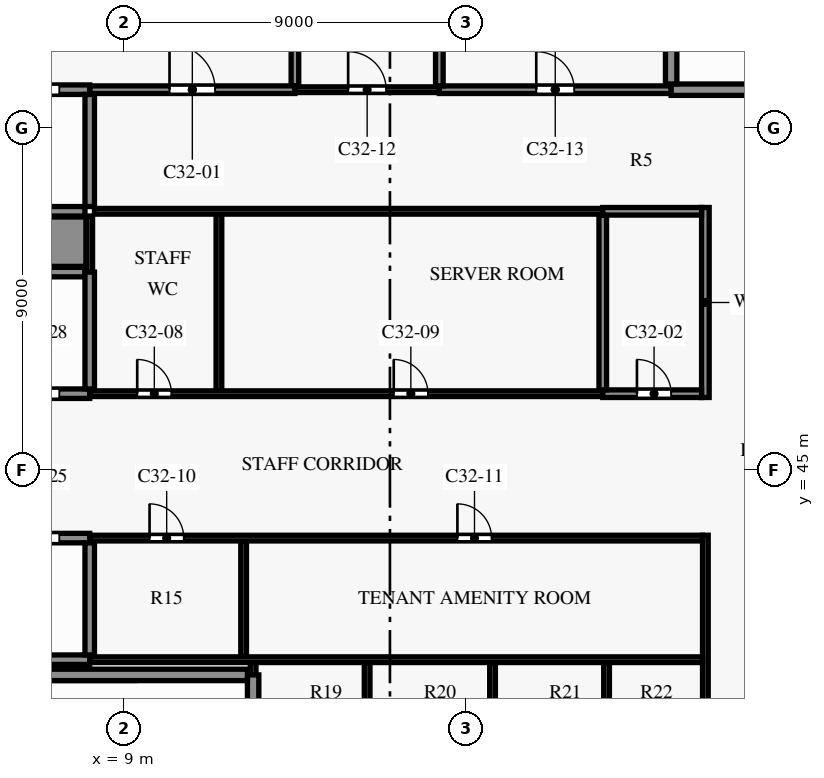
"""IFC4 building model, lengths in metres.
Left out: names, types, materials, properties, quantities, classifications, styles, units other than length and angle.
Written with IfcOpenShell. Run it as: python <this file> out.ifc"""

import sys

from ifc_helpers import new_model, si_unit, direction, frame, frame_2d, origin, place, context, subcontext, project, spatial, rectangle, extrude, element, fill, save


model = new_model("IFC4")
c1 = context("Model", 3, precision=1e-05, world=origin(), true_north=direction((0.0, 1.0)))
c2 = subcontext(c1, "Body", "Model", "MODEL_VIEW")
j1 = project(units=[si_unit("LENGTHUNIT", "METRE"), si_unit("PLANEANGLEUNIT", "RADIAN")], contexts=[c1])
p1 = place(None, origin())
s1 = spatial("IfcSite", under=j1, at=p1, CompositionType="ELEMENT")
p2 = place(p1, origin())
s2 = spatial("IfcBuilding", under=s1, at=p2, CompositionType="ELEMENT")
p3 = place(p2, frame((0.0, 0.0, 240.6)))
s3 = spatial("IfcBuildingStorey", under=s2, at=p3, CompositionType="ELEMENT", Elevation=240.6)
p4 = place(p3, frame((4.55, 39.6, 0.0), z_axis=(0.0, 0.0, 1.0), x_axis=(1.0, 0.0, 0.0)))
e1 = element("IfcWall", 1, at=p4, inside=s3, PredefinedType="SHEAR", context=c2, shape_type="SweptSolid", body=[
    extrude(rectangle(XDim=7.7, YDim=0.3, at=frame_2d((3.85, 0.0))), origin(), (0.0, 0.0, 1.0), 3.5),
])
p5 = place(p3, frame((8.1, 40.0, 0.0), z_axis=(0.0, 0.0, 1.0), x_axis=(1.0, 0.0, 0.0)))
e2 = element("IfcWall", 2, at=p5, inside=s3, PredefinedType="PARTITIONING", context=c2, shape_type="SweptSolid", body=[
    extrude(rectangle(XDim=16.125, YDim=0.15, at=frame_2d((8.062, 0.0))), origin(), (0.0, 0.0, 1.0), 3.5),
])
p6 = place(p3, frame((0.15, 40.0, 0.0), z_axis=(0.0, 0.0, 1.0), x_axis=(1.0, 0.0, 0.0)))
e3 = element("IfcWall", 3, at=p6, inside=s3, PredefinedType="SHEAR", context=c2, shape_type="SweptSolid", body=[
    extrude(rectangle(XDim=7.95, YDim=0.25, at=frame_2d((3.975, 0.0))), origin(), (0.0, 0.0, 1.0), 3.5),
])
p7 = place(p3, frame((8.1, 43.2, 0.0), z_axis=(0.0, 0.0, 1.0), x_axis=(1.0, 0.0, 0.0)))
e4 = element("IfcWall", 4, at=p7, inside=s3, PredefinedType="PARTITIONING", context=c2, shape_type="SweptSolid", body=[
    extrude(rectangle(XDim=16.125, YDim=0.15, at=frame_2d((8.062, 0.0))), origin(), (0.0, 0.0, 1.0), 3.5),
])
p8 = place(p7, frame((1.575, 0.0, 0.0)))
e5 = element("IfcOpeningElement", 5, at=p8, cuts=e4, PredefinedType="OPENING", context=c2, shape_type="SweptSolid", body=[
    extrude(rectangle(XDim=0.9, YDim=2.1, at=frame_2d((0.45, 1.05))), frame((0.0, 0.085, 0.0), z_axis=(0.0, -1.0, 0.0), x_axis=(1.0, 0.0, 0.0)), (0.0, 0.0, 1.0), 0.17),
])
p9 = place(p7, frame((9.675, 0.0, 0.0)))
e6 = element("IfcOpeningElement", 6, at=p9, cuts=e4, PredefinedType="OPENING", context=c2, shape_type="SweptSolid", body=[
    extrude(rectangle(XDim=0.9, YDim=2.1, at=frame_2d((0.45, 1.05))), frame((0.0, 0.085, 0.0), z_axis=(0.0, -1.0, 0.0), x_axis=(1.0, 0.0, 0.0)), (0.0, 0.0, 1.0), 0.17),
])
p10 = place(p3, frame((0.125, 43.2, 0.0), z_axis=(0.0, 0.0, 1.0), x_axis=(1.0, 0.0, 0.0)))
e7 = element("IfcWall", 7, at=p10, inside=s3, PredefinedType="SHEAR", context=c2, shape_type="SweptSolid", body=[
    extrude(rectangle(XDim=7.975, YDim=0.25, at=frame_2d((3.988, 0.0))), origin(), (0.0, 0.0, 1.0), 3.5),
])
p11 = place(p10, frame((0.675, 0.0, 0.0)))
e8 = element("IfcOpeningElement", 8, at=p11, cuts=e7, PredefinedType="OPENING", context=c2, shape_type="SweptSolid", body=[
    extrude(rectangle(XDim=1.1, YDim=2.1, at=frame_2d((0.55, 1.05))), frame((0.0, 0.135, 0.0), z_axis=(0.0, -1.0, 0.0), x_axis=(1.0, 0.0, 0.0)), (0.0, 0.0, 1.0), 0.27),
])
p12 = place(p10, frame((3.375, 0.0, 0.0)))
e9 = element("IfcOpeningElement", 9, at=p12, cuts=e7, PredefinedType="OPENING", context=c2, shape_type="SweptSolid", body=[
    extrude(rectangle(XDim=1.1, YDim=2.1, at=frame_2d((0.55, 1.05))), frame((0.0, 0.135, 0.0), z_axis=(0.0, -1.0, 0.0), x_axis=(1.0, 0.0, 0.0)), (0.0, 0.0, 1.0), 0.27),
])
p13 = place(p10, frame((6.075, 0.0, 0.0)))
e10 = element("IfcOpeningElement", 10, at=p13, cuts=e7, PredefinedType="OPENING", context=c2, shape_type="SweptSolid", body=[
    extrude(rectangle(XDim=1.1, YDim=2.1, at=frame_2d((0.55, 1.05))), frame((0.0, 0.135, 0.0), z_axis=(0.0, -1.0, 0.0), x_axis=(1.0, 0.0, 0.0)), (0.0, 0.0, 1.0), 0.27),
])
p14 = place(p3, frame((8.1, 47.0, 0.0), z_axis=(0.0, 0.0, 1.0), x_axis=(1.0, 0.0, 0.0)))
e11 = element("IfcWall", 11, at=p14, inside=s3, PredefinedType="PARTITIONING", context=c2, shape_type="SweptSolid", body=[
    extrude(rectangle(XDim=13.5, YDim=0.15, at=frame_2d((6.75, 0.0))), origin(), (0.0, 0.0, 1.0), 3.5),
])
p15 = place(p14, frame((1.25, 0.0, 0.0)))
e12 = element("IfcOpeningElement", 12, at=p15, cuts=e11, PredefinedType="OPENING", context=c2, shape_type="SweptSolid", body=[
    extrude(rectangle(XDim=0.9, YDim=2.1, at=frame_2d((0.45, 1.05))), frame((0.0, 0.085, 0.0), z_axis=(0.0, -1.0, 0.0), x_axis=(1.0, 0.0, 0.0)), (0.0, 0.0, 1.0), 0.17),
])
p16 = place(p14, frame((8.0, 0.0, 0.0)))
e13 = element("IfcOpeningElement", 13, at=p16, cuts=e11, PredefinedType="OPENING", context=c2, shape_type="SweptSolid", body=[
    extrude(rectangle(XDim=0.9, YDim=2.1, at=frame_2d((0.45, 1.05))), frame((0.0, 0.085, 0.0), z_axis=(0.0, -1.0, 0.0), x_axis=(1.0, 0.0, 0.0)), (0.0, 0.0, 1.0), 0.17),
])
p17 = place(p3, frame((21.6, 47.0, 0.0), z_axis=(0.0, 0.0, 1.0), x_axis=(1.0, 0.0, 0.0)))
e14 = element("IfcWall", 14, at=p17, inside=s3, PredefinedType="PARTITIONING", context=c2, shape_type="SweptSolid", body=[
    extrude(rectangle(XDim=2.6, YDim=0.2, at=frame_2d((1.3, 0.0))), origin(), (0.0, 0.0, 1.0), 3.5),
])
p18 = place(p17, frame((0.9, 0.0, 0.0)))
e15 = element("IfcOpeningElement", 15, at=p18, cuts=e14, PredefinedType="OPENING", context=c2, shape_type="SweptSolid", body=[
    extrude(rectangle(XDim=0.9, YDim=2.1, at=frame_2d((0.45, 1.05))), frame((0.0, 0.11, 0.0), z_axis=(0.0, -1.0, 0.0), x_axis=(1.0, 0.0, 0.0)), (0.0, 0.0, 1.0), 0.22),
])
p19 = place(p3, frame((0.125, 47.0, 0.0), z_axis=(0.0, 0.0, 1.0), x_axis=(1.0, 0.0, 0.0)))
e16 = element("IfcWall", 16, at=p19, inside=s3, PredefinedType="SHEAR", context=c2, shape_type="SweptSolid", body=[
    extrude(rectangle(XDim=7.975, YDim=0.25, at=frame_2d((3.988, 0.0))), origin(), (0.0, 0.0, 1.0), 3.5),
])
p20 = place(p19, frame((0.675, 0.0, 0.0)))
e17 = element("IfcOpeningElement", 17, at=p20, cuts=e16, PredefinedType="OPENING", context=c2, shape_type="SweptSolid", body=[
    extrude(rectangle(XDim=1.1, YDim=2.1, at=frame_2d((0.55, 1.05))), frame((0.0, 0.135, 0.0), z_axis=(0.0, -1.0, 0.0), x_axis=(1.0, 0.0, 0.0)), (0.0, 0.0, 1.0), 0.27),
])
p21 = place(p19, frame((3.375, 0.0, 0.0)))
e18 = element("IfcOpeningElement", 18, at=p21, cuts=e16, PredefinedType="OPENING", context=c2, shape_type="SweptSolid", body=[
    extrude(rectangle(XDim=1.1, YDim=2.1, at=frame_2d((0.55, 1.05))), frame((0.0, 0.135, 0.0), z_axis=(0.0, -1.0, 0.0), x_axis=(1.0, 0.0, 0.0)), (0.0, 0.0, 1.0), 0.27),
])
p22 = place(p19, frame((6.075, 0.0, 0.0)))
e19 = element("IfcOpeningElement", 19, at=p22, cuts=e16, PredefinedType="OPENING", context=c2, shape_type="SweptSolid", body=[
    extrude(rectangle(XDim=1.1, YDim=2.1, at=frame_2d((0.55, 1.05))), frame((0.0, 0.135, 0.0), z_axis=(0.0, -1.0, 0.0), x_axis=(1.0, 0.0, 0.0)), (0.0, 0.0, 1.0), 0.27),
])
p23 = place(p3, frame((0.125, 50.2, 0.0), z_axis=(0.0, 0.0, 1.0), x_axis=(1.0, 0.0, 0.0)))
e20 = element("IfcWall", 20, at=p23, inside=s3, PredefinedType="SHEAR", context=c2, shape_type="SweptSolid", body=[
    extrude(rectangle(XDim=7.85, YDim=0.25, at=frame_2d((3.925, 0.0))), origin(), (0.0, 0.0, 1.0), 3.5),
])
p24 = place(p3, frame((-0.125, 51.0, 0.0), z_axis=(0.0, 0.0, 1.0), x_axis=(1.0, 0.0, 0.0)))
e21 = element("IfcWall", 21, at=p24, inside=s3, PredefinedType="SHEAR", context=c2, shape_type="SweptSolid", body=[
    extrude(rectangle(XDim=8.125, YDim=1.3, at=frame_2d((4.062, 0.0))), origin(), (0.0, 0.0, 1.0), 3.5),
])
p25 = place(p3, frame((8.225, 51.8, 0.0), z_axis=(0.0, 0.0, 1.0), x_axis=(1.0, 0.0, 0.0)))
e22 = element("IfcWall", 22, at=p25, inside=s3, PredefinedType="PARTITIONING", context=c2, shape_type="SweptSolid", body=[
    extrude(rectangle(XDim=13.375, YDim=0.15, at=frame_2d((6.688, 0.0))), origin(), (0.0, 0.0, 1.0), 3.5),
])
p26 = place(p3, frame((21.6, 51.8, 0.0), z_axis=(0.0, 0.0, 1.0), x_axis=(1.0, 0.0, 0.0)))
e23 = element("IfcWall", 23, at=p26, inside=s3, PredefinedType="PARTITIONING", context=c2, shape_type="SweptSolid", body=[
    extrude(rectangle(XDim=2.6, YDim=0.2, at=frame_2d((1.3, 0.0))), origin(), (0.0, 0.0, 1.0), 3.5),
])
p27 = place(p3, frame((0.125, 51.8, 0.0), z_axis=(0.0, 0.0, 1.0), x_axis=(1.0, 0.0, 0.0)))
e24 = element("IfcWall", 24, at=p27, inside=s3, PredefinedType="SHEAR", context=c2, shape_type="SweptSolid", body=[
    extrude(rectangle(XDim=7.85, YDim=0.25, at=frame_2d((3.925, 0.0))), origin(), (0.0, 0.0, 1.0), 3.5),
])
p28 = place(p3, frame((8.1, 55.0, 0.0), z_axis=(0.0, 0.0, 1.0), x_axis=(1.0, 0.0, 0.0)))
e25 = element("IfcWall", 25, at=p28, inside=s3, PredefinedType="PARTITIONING", context=c2, shape_type="SweptSolid", body=[
    extrude(rectangle(XDim=5.4, YDim=0.2, at=frame_2d((2.7, 0.0))), origin(), (0.0, 0.0, 1.0), 3.5),
])
p29 = place(p28, frame((2.1, 0.0, 0.0)))
e26 = element("IfcOpeningElement", 26, at=p29, cuts=e25, PredefinedType="OPENING", context=c2, shape_type="SweptSolid", body=[
    extrude(rectangle(XDim=1.2, YDim=2.2, at=frame_2d((0.6, 1.1))), frame((0.0, 0.11, 0.0), z_axis=(0.0, -1.0, 0.0), x_axis=(1.0, 0.0, 0.0)), (0.0, 0.0, 1.0), 0.22),
])
p30 = place(p3, frame((13.5, 55.0, 0.0), z_axis=(0.0, 0.0, 1.0), x_axis=(1.0, 0.0, 0.0)))
e27 = element("IfcWall", 27, at=p30, inside=s3, PredefinedType="PARTITIONING", context=c2, shape_type="SweptSolid", body=[
    extrude(rectangle(XDim=3.8, YDim=0.15, at=frame_2d((1.9, 0.0))), origin(), (0.0, 0.0, 1.0), 3.5),
])
p31 = place(p30, frame((1.4, 0.0, 0.0)))
e28 = element("IfcOpeningElement", 28, at=p31, cuts=e27, PredefinedType="OPENING", context=c2, shape_type="SweptSolid", body=[
    extrude(rectangle(XDim=1.0, YDim=2.1, at=frame_2d((0.5, 1.05))), frame((0.0, 0.085, 0.0), z_axis=(0.0, -1.0, 0.0), x_axis=(1.0, 0.0, 0.0)), (0.0, 0.0, 1.0), 0.17),
])
p32 = place(p3, frame((17.3, 55.0, 0.0), z_axis=(0.0, 0.0, 1.0), x_axis=(1.0, 0.0, 0.0)))
e29 = element("IfcWall", 29, at=p32, inside=s3, PredefinedType="PARTITIONING", context=c2, shape_type="SweptSolid", body=[
    extrude(rectangle(XDim=6.1, YDim=0.2, at=frame_2d((3.05, 0.0))), origin(), (0.0, 0.0, 1.0), 3.5),
])
p33 = place(p32, frame((2.55, 0.0, 0.0)))
e30 = element("IfcOpeningElement", 30, at=p33, cuts=e29, PredefinedType="OPENING", context=c2, shape_type="SweptSolid", body=[
    extrude(rectangle(XDim=1.0, YDim=2.1, at=frame_2d((0.5, 1.05))), frame((0.0, 0.11, 0.0), z_axis=(0.0, -1.0, 0.0), x_axis=(1.0, 0.0, 0.0)), (0.0, 0.0, 1.0), 0.22),
])
p34 = place(p3, frame((0.15, 55.0, 0.0), z_axis=(0.0, 0.0, 1.0), x_axis=(1.0, 0.0, 0.0)))
e31 = element("IfcWall", 31, at=p34, inside=s3, PredefinedType="SHEAR", context=c2, shape_type="SweptSolid", body=[
    extrude(rectangle(XDim=7.95, YDim=0.25, at=frame_2d((3.975, 0.0))), origin(), (0.0, 0.0, 1.0), 3.5),
])
p35 = place(p34, frame((0.65, 0.0, 0.0)))
e32 = element("IfcOpeningElement", 32, at=p35, cuts=e31, PredefinedType="OPENING", context=c2, shape_type="SweptSolid", body=[
    extrude(rectangle(XDim=1.1, YDim=2.1, at=frame_2d((0.55, 1.05))), frame((0.0, 0.135, 0.0), z_axis=(0.0, -1.0, 0.0), x_axis=(1.0, 0.0, 0.0)), (0.0, 0.0, 1.0), 0.27),
])
p36 = place(p34, frame((3.35, 0.0, 0.0)))
e33 = element("IfcOpeningElement", 33, at=p36, cuts=e31, PredefinedType="OPENING", context=c2, shape_type="SweptSolid", body=[
    extrude(rectangle(XDim=1.1, YDim=2.1, at=frame_2d((0.55, 1.05))), frame((0.0, 0.135, 0.0), z_axis=(0.0, -1.0, 0.0), x_axis=(1.0, 0.0, 0.0)), (0.0, 0.0, 1.0), 0.27),
])
p37 = place(p34, frame((6.05, 0.0, 0.0)))
e34 = element("IfcOpeningElement", 34, at=p37, cuts=e31, PredefinedType="OPENING", context=c2, shape_type="SweptSolid", body=[
    extrude(rectangle(XDim=1.1, YDim=2.1, at=frame_2d((0.55, 1.05))), frame((0.0, 0.135, 0.0), z_axis=(0.0, -1.0, 0.0), x_axis=(1.0, 0.0, 0.0)), (0.0, 0.0, 1.0), 0.27),
])
p38 = place(p3, frame((23.4, 55.0, 0.0), z_axis=(0.0, 0.0, 1.0), x_axis=(1.0, 0.0, 0.0)))
e35 = element("IfcWall", 35, at=p38, inside=s3, PredefinedType="SHEAR", context=c2, shape_type="SweptSolid", body=[
    extrude(rectangle(XDim=3.45, YDim=0.3, at=frame_2d((1.725, 0.0))), origin(), (0.0, 0.0, 1.0), 3.5),
])
p39 = place(p3, frame((8.1, 50.2, 0.0), z_axis=(0.0, 0.0, 1.0), x_axis=(0.0, 1.0, 0.0)))
e36 = element("IfcWall", 36, at=p39, inside=s3, PredefinedType="PARTITIONING", context=c2, shape_type="SweptSolid", body=[
    extrude(rectangle(XDim=1.475, YDim=0.15, at=frame_2d((0.738, 0.0))), origin(), (0.0, 0.0, 1.0), 3.5),
])
p40 = place(p3, frame((8.1, 40.125, 0.0), z_axis=(0.0, 0.0, 1.0), x_axis=(0.0, 1.0, 0.0)))
e37 = element("IfcWall", 37, at=p40, inside=s3, PredefinedType="SHEAR", context=c2, shape_type="SweptSolid", body=[
    extrude(rectangle(XDim=2.95, YDim=0.25, at=frame_2d((1.475, 0.0))), origin(), (0.0, 0.0, 1.0), 3.5),
])
p41 = place(p3, frame((8.1, 47.125, 0.0), z_axis=(0.0, 0.0, 1.0), x_axis=(0.0, 1.0, 0.0)))
e38 = element("IfcWall", 38, at=p41, inside=s3, PredefinedType="SHEAR", context=c2, shape_type="SweptSolid", body=[
    extrude(rectangle(XDim=3.075, YDim=0.25, at=frame_2d((1.538, 0.0))), origin(), (0.0, 0.0, 1.0), 3.5),
])
p42 = place(p3, frame((8.1, 51.925, 0.0), z_axis=(0.0, 0.0, 1.0), x_axis=(0.0, 1.0, 0.0)))
e39 = element("IfcWall", 39, at=p42, inside=s3, PredefinedType="SHEAR", context=c2, shape_type="SweptSolid", body=[
    extrude(rectangle(XDim=2.95, YDim=0.25, at=frame_2d((1.475, 0.0))), origin(), (0.0, 0.0, 1.0), 3.5),
])
p43 = place(p3, frame((11.5, 47.075, 0.0), z_axis=(0.0, 0.0, 1.0), x_axis=(0.0, 1.0, 0.0)))
e40 = element("IfcWall", 40, at=p43, inside=s3, PredefinedType="PARTITIONING", context=c2, shape_type="SweptSolid", body=[
    extrude(rectangle(XDim=4.65, YDim=0.15, at=frame_2d((2.325, 0.0))), origin(), (0.0, 0.0, 1.0), 3.5),
])
p44 = place(p3, frame((12.15, 40.075, 0.0), z_axis=(0.0, 0.0, 1.0), x_axis=(0.0, 1.0, 0.0)))
e41 = element("IfcWall", 41, at=p44, inside=s3, PredefinedType="PARTITIONING", context=c2, shape_type="SweptSolid", body=[
    extrude(rectangle(XDim=3.05, YDim=0.15, at=frame_2d((1.525, 0.0))), origin(), (0.0, 0.0, 1.0), 3.5),
])
p45 = place(p3, frame((12.4, 39.6, 0.0), z_axis=(0.0, 0.0, 1.0), x_axis=(0.0, 1.0, 0.0)))
e42 = element("IfcWall", 42, at=p45, inside=s3, PredefinedType="PARTITIONING", context=c2, shape_type="SweptSolid", body=[
    extrude(rectangle(XDim=0.325, YDim=0.15, at=frame_2d((0.163, 0.0))), origin(), (0.0, 0.0, 1.0), 3.5),
])
p46 = place(p3, frame((12.4, 36.15, 0.0), z_axis=(0.0, 0.0, 1.0), x_axis=(0.0, 1.0, 0.0)))
e43 = element("IfcWall", 43, at=p46, inside=s3, PredefinedType="SHEAR", context=c2, shape_type="SweptSolid", body=[
    extrude(rectangle(XDim=3.45, YDim=0.3, at=frame_2d((1.725, 0.0))), origin(), (0.0, 0.0, 1.0), 3.5),
])
p47 = place(p3, frame((13.5, 55.1, 0.0), z_axis=(0.0, 0.0, 1.0), x_axis=(0.0, 1.0, 0.0)))
e44 = element("IfcWall", 44, at=p47, inside=s3, PredefinedType="PARTITIONING", context=c2, shape_type="SweptSolid", body=[
    extrude(rectangle(XDim=3.9, YDim=0.2, at=frame_2d((1.95, 0.0))), origin(), (0.0, 0.0, 1.0), 3.5),
])
p48 = place(p3, frame((15.4, 36.075, 0.0), z_axis=(0.0, 0.0, 1.0), x_axis=(0.0, 1.0, 0.0)))
e45 = element("IfcWall", 45, at=p48, inside=s3, PredefinedType="PARTITIONING", context=c2, shape_type="SweptSolid", body=[
    extrude(rectangle(XDim=3.85, YDim=0.15, at=frame_2d((1.925, 0.0))), origin(), (0.0, 0.0, 1.0), 3.5),
])
p49 = place(p3, frame((17.3, 55.1, 0.0), z_axis=(0.0, 0.0, 1.0), x_axis=(0.0, 1.0, 0.0)))
e46 = element("IfcWall", 46, at=p49, inside=s3, PredefinedType="PARTITIONING", context=c2, shape_type="SweptSolid", body=[
    extrude(rectangle(XDim=7.05, YDim=0.2, at=frame_2d((3.525, 0.0))), origin(), (0.0, 0.0, 1.0), 3.5),
])
p50 = place(p3, frame((18.7, 36.075, 0.0), z_axis=(0.0, 0.0, 1.0), x_axis=(0.0, 1.0, 0.0)))
e47 = element("IfcWall", 47, at=p50, inside=s3, PredefinedType="PARTITIONING", context=c2, shape_type="SweptSolid", body=[
    extrude(rectangle(XDim=3.85, YDim=0.15, at=frame_2d((1.925, 0.0))), origin(), (0.0, 0.0, 1.0), 3.5),
])
p51 = place(p3, frame((21.6, 47.1, 0.0), z_axis=(0.0, 0.0, 1.0), x_axis=(0.0, 1.0, 0.0)))
e48 = element("IfcWall", 48, at=p51, inside=s3, PredefinedType="PARTITIONING", context=c2, shape_type="SweptSolid", body=[
    extrude(rectangle(XDim=4.6, YDim=0.2, at=frame_2d((2.3, 0.0))), origin(), (0.0, 0.0, 1.0), 3.5),
])
p52 = place(p3, frame((21.7, 36.075, 0.0), z_axis=(0.0, 0.0, 1.0), x_axis=(0.0, 1.0, 0.0)))
e49 = element("IfcWall", 49, at=p52, inside=s3, PredefinedType="PARTITIONING", context=c2, shape_type="SweptSolid", body=[
    extrude(rectangle(XDim=3.85, YDim=0.15, at=frame_2d((1.925, 0.0))), origin(), (0.0, 0.0, 1.0), 3.5),
])
p53 = place(p3, frame((23.4, 55.15, 0.0), z_axis=(0.0, 0.0, 1.0), x_axis=(0.0, 1.0, 0.0)))
e50 = element("IfcWall", 50, at=p53, inside=s3, PredefinedType="SHEAR", context=c2, shape_type="SweptSolid", body=[
    extrude(rectangle(XDim=8.0, YDim=0.3, at=frame_2d((4.0, 0.0))), origin(), (0.0, 0.0, 1.0), 3.5),
])
p54 = place(p3, frame((24.3, 35.925, 0.0), z_axis=(0.0, 0.0, 1.0), x_axis=(0.0, 1.0, 0.0)))
e51 = element("IfcWall", 51, at=p54, inside=s3, PredefinedType="PARTITIONING", context=c2, shape_type="SweptSolid", body=[
    extrude(rectangle(XDim=7.35, YDim=0.15, at=frame_2d((3.675, 0.0))), origin(), (0.0, 0.0, 1.0), 3.5),
])
p55 = place(p3, frame((24.3, 46.9, 0.0), z_axis=(0.0, 0.0, 1.0), x_axis=(0.0, 1.0, 0.0)))
e52 = element("IfcWall", 52, at=p55, inside=s3, PredefinedType="SHEAR", context=c2, shape_type="SweptSolid", body=[
    extrude(rectangle(XDim=5.0, YDim=0.2, at=frame_2d((2.5, 0.0))), origin(), (0.0, 0.0, 1.0), 3.5),
])
p56 = place(p29, origin())
e53 = element("IfcDoor", 53, at=p56, inside=s3, OperationType="SINGLE_SWING_RIGHT", PredefinedType="DOOR", context=c2, shape_type="SweptSolid", body=[
    extrude(rectangle(XDim=1.2, YDim=2.2, at=frame_2d((0.6, 1.1))), frame((0.0, 0.025, 0.0), z_axis=(0.0, -1.0, 0.0), x_axis=(1.0, 0.0, 0.0)), (0.0, 0.0, 1.0), 0.05),
])
fill(e26, e53)
p57 = place(p18, origin())
e54 = element("IfcDoor", 54, at=p57, inside=s3, OperationType="SINGLE_SWING_LEFT", PredefinedType="DOOR", context=c2, shape_type="SweptSolid", body=[
    extrude(rectangle(XDim=0.9, YDim=2.1, at=frame_2d((0.45, 1.05))), frame((0.0, 0.025, 0.0), z_axis=(0.0, -1.0, 0.0), x_axis=(1.0, 0.0, 0.0)), (0.0, 0.0, 1.0), 0.05),
])
fill(e15, e54)
p58 = place(p15, origin())
e55 = element("IfcDoor", 55, at=p58, inside=s3, OperationType="SINGLE_SWING_LEFT", PredefinedType="DOOR", context=c2, shape_type="SweptSolid", body=[
    extrude(rectangle(XDim=0.9, YDim=2.1, at=frame_2d((0.45, 1.05))), frame((0.0, 0.025, 0.0), z_axis=(0.0, -1.0, 0.0), x_axis=(1.0, 0.0, 0.0)), (0.0, 0.0, 1.0), 0.05),
])
fill(e12, e55)
p59 = place(p16, origin())
e56 = element("IfcDoor", 56, at=p59, inside=s3, OperationType="SINGLE_SWING_RIGHT", PredefinedType="DOOR", context=c2, shape_type="SweptSolid", body=[
    extrude(rectangle(XDim=0.9, YDim=2.1, at=frame_2d((0.45, 1.05))), frame((0.0, 0.025, 0.0), z_axis=(0.0, -1.0, 0.0), x_axis=(1.0, 0.0, 0.0)), (0.0, 0.0, 1.0), 0.05),
])
fill(e13, e56)
p60 = place(p8, origin())
e57 = element("IfcDoor", 57, at=p60, inside=s3, OperationType="SINGLE_SWING_RIGHT", PredefinedType="DOOR", context=c2, shape_type="SweptSolid", body=[
    extrude(rectangle(XDim=0.9, YDim=2.1, at=frame_2d((0.45, 1.05))), frame((0.0, 0.025, 0.0), z_axis=(0.0, -1.0, 0.0), x_axis=(1.0, 0.0, 0.0)), (0.0, 0.0, 1.0), 0.05),
])
fill(e5, e57)
p61 = place(p9, origin())
e58 = element("IfcDoor", 58, at=p61, inside=s3, OperationType="SINGLE_SWING_LEFT", PredefinedType="DOOR", context=c2, shape_type="SweptSolid", body=[
    extrude(rectangle(XDim=0.9, YDim=2.1, at=frame_2d((0.45, 1.05))), frame((0.0, 0.025, 0.0), z_axis=(0.0, -1.0, 0.0), x_axis=(1.0, 0.0, 0.0)), (0.0, 0.0, 1.0), 0.05),
])
fill(e6, e58)
p62 = place(p31, origin())
e59 = element("IfcDoor", 59, at=p62, inside=s3, OperationType="SINGLE_SWING_LEFT", PredefinedType="DOOR", context=c2, shape_type="SweptSolid", body=[
    extrude(rectangle(XDim=1.0, YDim=2.1, at=frame_2d((0.5, 1.05))), frame((0.0, 0.025, 0.0), z_axis=(0.0, -1.0, 0.0), x_axis=(1.0, 0.0, 0.0)), (0.0, 0.0, 1.0), 0.05),
])
fill(e28, e59)
p63 = place(p33, origin())
e60 = element("IfcDoor", 60, at=p63, inside=s3, OperationType="SINGLE_SWING_RIGHT", PredefinedType="DOOR", context=c2, shape_type="SweptSolid", body=[
    extrude(rectangle(XDim=1.0, YDim=2.1, at=frame_2d((0.5, 1.05))), frame((0.0, 0.025, 0.0), z_axis=(0.0, -1.0, 0.0), x_axis=(1.0, 0.0, 0.0)), (0.0, 0.0, 1.0), 0.05),
])
fill(e30, e60)
p64 = place(p37, origin())
e61 = element("IfcDoor", 61, at=p64, inside=s3, OperationType="DOUBLE_DOOR_SLIDING", PredefinedType="DOOR", context=c2, shape_type="SweptSolid", body=[
    extrude(rectangle(XDim=1.1, YDim=2.1, at=frame_2d((0.55, 1.05))), frame((0.0, 0.025, 0.0), z_axis=(0.0, -1.0, 0.0), x_axis=(1.0, 0.0, 0.0)), (0.0, 0.0, 1.0), 0.05),
])
fill(e34, e61)
p65 = place(p13, origin())
e62 = element("IfcDoor", 62, at=p65, inside=s3, OperationType="DOUBLE_DOOR_SLIDING", PredefinedType="DOOR", context=c2, shape_type="SweptSolid", body=[
    extrude(rectangle(XDim=1.1, YDim=2.1, at=frame_2d((0.55, 1.05))), frame((0.0, 0.025, 0.0), z_axis=(0.0, -1.0, 0.0), x_axis=(1.0, 0.0, 0.0)), (0.0, 0.0, 1.0), 0.05),
])
fill(e10, e62)
p66 = place(p22, origin())
e63 = element("IfcDoor", 63, at=p66, inside=s3, OperationType="DOUBLE_DOOR_SLIDING", PredefinedType="DOOR", context=c2, shape_type="SweptSolid", body=[
    extrude(rectangle(XDim=1.1, YDim=2.1, at=frame_2d((0.55, 1.05))), frame((0.0, 0.025, 0.0), z_axis=(0.0, -1.0, 0.0), x_axis=(1.0, 0.0, 0.0)), (0.0, 0.0, 1.0), 0.05),
])
fill(e19, e63)
save(model, sys.argv[1])
